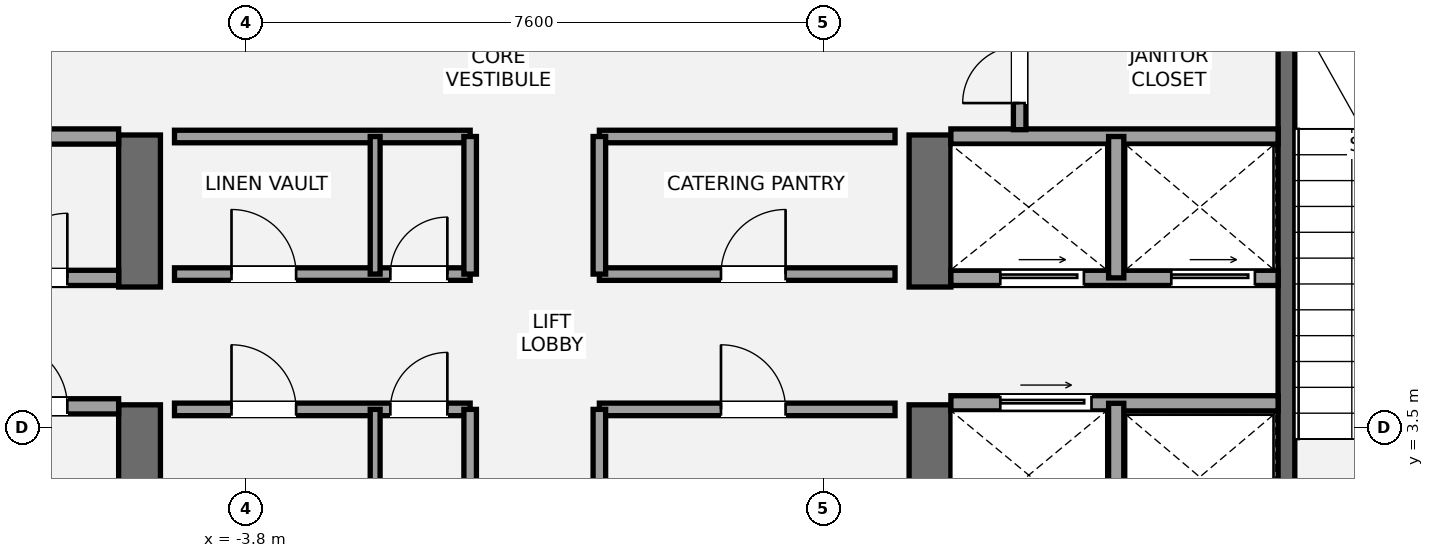
"""IFC4 building model, lengths in metres.
Left out: names, types, materials, properties, quantities, classifications, styles, units other than length and angle.
Written with IfcOpenShell. Run it as: python <this file> out.ifc"""

import sys

from ifc_helpers import new_model, si_unit, direction, frame, frame_2d, origin, place, context, subcontext, project, spatial, rectangle, extrude, element, fill, save


model = new_model("IFC4")
c1 = context("Model", 3, precision=1e-05, world=origin(), true_north=direction((0.0, 1.0)))
c2 = subcontext(c1, "Body", "Model", "MODEL_VIEW")
j1 = project(units=[si_unit("LENGTHUNIT", "METRE"), si_unit("PLANEANGLEUNIT", "RADIAN")], contexts=[c1])
p1 = place(None, origin())
s1 = spatial("IfcSite", under=j1, at=p1, CompositionType="ELEMENT")
p2 = place(p1, origin())
s2 = spatial("IfcBuilding", under=s1, at=p2, CompositionType="ELEMENT")
p3 = place(p2, frame((0.0, 0.0, 260.4)))
s3 = spatial("IfcBuildingStorey", under=s2, at=p3, CompositionType="ELEMENT", Elevation=260.4)
p4 = place(p3, frame((-5.2, 1.3, 0.0), z_axis=(0.0, 0.0, 1.0), x_axis=(0.0, 1.0, 0.0)))
e1 = element("IfcWall", 1, at=p4, inside=s3, PredefinedType="SHEAR", context=c2, shape_type="SweptSolid", body=[
    extrude(rectangle(XDim=2.5, YDim=0.55, at=frame_2d((1.25, 0.0))), origin(), (0.0, 0.0, 1.0), 4.4),
])
p5 = place(p3, frame((-5.2, 5.35, 0.0), z_axis=(0.0, 0.0, 1.0), x_axis=(0.0, 1.0, 0.0)))
e2 = element("IfcWall", 2, at=p5, inside=s3, PredefinedType="SHEAR", context=c2, shape_type="SweptSolid", body=[
    extrude(rectangle(XDim=2.0, YDim=0.55, at=frame_2d((1.0, 0.0))), origin(), (0.0, 0.0, 1.0), 4.4),
])
p6 = place(p3, frame((5.2, 1.3, 0.0), z_axis=(0.0, 0.0, 1.0), x_axis=(0.0, 1.0, 0.0)))
e3 = element("IfcWall", 3, at=p6, inside=s3, PredefinedType="SHEAR", context=c2, shape_type="SweptSolid", body=[
    extrude(rectangle(XDim=2.5, YDim=0.55, at=frame_2d((1.25, 0.0))), origin(), (0.0, 0.0, 1.0), 4.4),
])
p7 = place(p3, frame((5.2, 5.35, 0.0), z_axis=(0.0, 0.0, 1.0), x_axis=(0.0, 1.0, 0.0)))
e4 = element("IfcWall", 4, at=p7, inside=s3, PredefinedType="SHEAR", context=c2, shape_type="SweptSolid", body=[
    extrude(rectangle(XDim=2.0, YDim=0.55, at=frame_2d((1.0, 0.0))), origin(), (0.0, 0.0, 1.0), 4.4),
])
p8 = place(p3, frame((9.89, 1.85, 0.0), z_axis=(0.0, 0.0, 1.0), x_axis=(0.0, 1.0, 0.0)))
e5 = element("IfcWall", 5, at=p8, inside=s3, PredefinedType="SHEAR", context=c2, shape_type="SweptSolid", body=[
    extrude(rectangle(XDim=7.15, YDim=0.22, at=frame_2d((3.575, 0.0))), origin(), (0.0, 0.0, 1.0), 4.4),
])
p9 = place(p3, frame((-9.78, 3.78, 0.0), z_axis=(0.0, 0.0, 1.0), x_axis=(1.0, 0.0, 0.0)))
e6 = element("IfcWall", 6, at=p9, inside=s3, PredefinedType="SOLIDWALL", context=c2, shape_type="SweptSolid", body=[
    extrude(rectangle(XDim=4.305, YDim=0.2, at=frame_2d((2.152, 0.0))), origin(), (0.0, 0.0, 1.0), 4.18),
])
p10 = place(p9, frame((2.78, 0.0, 0.0)))
e7 = element("IfcOpeningElement", 7, at=p10, cuts=e6, PredefinedType="OPENING", context=c2, shape_type="SweptSolid", body=[
    extrude(rectangle(XDim=0.85, YDim=2.1, at=frame_2d((0.425, 1.05))), frame((0.0, 0.11, 0.0), z_axis=(0.0, -1.0, 0.0), x_axis=(1.0, 0.0, 0.0)), (0.0, 0.0, 1.0), 0.22),
])
p11 = place(p3, frame((-9.78, 5.47, 0.0), z_axis=(0.0, 0.0, 1.0), x_axis=(1.0, 0.0, 0.0)))
e8 = element("IfcWall", 8, at=p11, inside=s3, PredefinedType="SOLIDWALL", context=c2, shape_type="SweptSolid", body=[
    extrude(rectangle(XDim=4.305, YDim=0.2, at=frame_2d((2.152, 0.0))), origin(), (0.0, 0.0, 1.0), 4.18),
])
p12 = place(p11, frame((2.78, 0.0, 0.0)))
e9 = element("IfcOpeningElement", 9, at=p12, cuts=e8, PredefinedType="OPENING", context=c2, shape_type="SweptSolid", body=[
    extrude(rectangle(XDim=0.85, YDim=2.1, at=frame_2d((0.425, 1.05))), frame((0.0, 0.11, 0.0), z_axis=(0.0, -1.0, 0.0), x_axis=(1.0, 0.0, 0.0)), (0.0, 0.0, 1.0), 0.22),
])
p13 = place(p3, frame((-9.78, 7.33, 0.0), z_axis=(0.0, 0.0, 1.0), x_axis=(1.0, 0.0, 0.0)))
e10 = element("IfcWall", 10, at=p13, inside=s3, PredefinedType="SOLIDWALL", context=c2, shape_type="SweptSolid", body=[
    extrude(rectangle(XDim=4.305, YDim=0.2, at=frame_2d((2.152, 0.0))), origin(), (0.0, 0.0, 1.0), 4.18),
])
p14 = place(p3, frame((5.475, 3.82, 0.0), z_axis=(0.0, 0.0, 1.0), x_axis=(1.0, 0.0, 0.0)))
e11 = element("IfcWall", 11, at=p14, inside=s3, PredefinedType="SOLIDWALL", context=c2, shape_type="SweptSolid", body=[
    extrude(rectangle(XDim=4.305, YDim=0.2, at=frame_2d((2.152, 0.0))), origin(), (0.0, 0.0, 1.0), 4.18),
])
p15 = place(p14, frame((0.65, 0.0, 0.0)))
e12 = element("IfcOpeningElement", 12, at=p15, cuts=e11, PredefinedType="OPENING", context=c2, shape_type="SweptSolid", body=[
    extrude(rectangle(XDim=1.2, YDim=2.2, at=frame_2d((0.6, 1.1))), frame((0.0, 0.11, 0.0), z_axis=(0.0, -1.0, 0.0), x_axis=(1.0, 0.0, 0.0)), (0.0, 0.0, 1.0), 0.22),
])
p16 = place(p3, frame((7.65, 1.85, 0.0), z_axis=(0.0, 0.0, 1.0), x_axis=(0.0, 1.0, 0.0)))
e13 = element("IfcWall", 13, at=p16, inside=s3, PredefinedType="SOLIDWALL", context=c2, shape_type="SweptSolid", body=[
    extrude(rectangle(XDim=1.97, YDim=0.2, at=frame_2d((0.985, 0.0))), origin(), (0.0, 0.0, 1.0), 4.18),
])
p17 = place(p3, frame((5.475, 5.47, 0.0), z_axis=(0.0, 0.0, 1.0), x_axis=(1.0, 0.0, 0.0)))
e14 = element("IfcWall", 14, at=p17, inside=s3, PredefinedType="SOLIDWALL", context=c2, shape_type="SweptSolid", body=[
    extrude(rectangle(XDim=4.305, YDim=0.2, at=frame_2d((2.152, 0.0))), origin(), (0.0, 0.0, 1.0), 4.18),
])
p18 = place(p17, frame((0.65, 0.0, 0.0)))
e15 = element("IfcOpeningElement", 15, at=p18, cuts=e14, PredefinedType="OPENING", context=c2, shape_type="SweptSolid", body=[
    extrude(rectangle(XDim=1.1, YDim=2.2, at=frame_2d((0.55, 1.1))), frame((0.0, 0.11, 0.0), z_axis=(0.0, -1.0, 0.0), x_axis=(1.0, 0.0, 0.0)), (0.0, 0.0, 1.0), 0.22),
])
p19 = place(p17, frame((2.9, 0.0, 0.0)))
e16 = element("IfcOpeningElement", 16, at=p19, cuts=e14, PredefinedType="OPENING", context=c2, shape_type="SweptSolid", body=[
    extrude(rectangle(XDim=1.1, YDim=2.2, at=frame_2d((0.55, 1.1))), frame((0.0, 0.11, 0.0), z_axis=(0.0, -1.0, 0.0), x_axis=(1.0, 0.0, 0.0)), (0.0, 0.0, 1.0), 0.22),
])
p20 = place(p3, frame((5.475, 7.33, 0.0), z_axis=(0.0, 0.0, 1.0), x_axis=(1.0, 0.0, 0.0)))
e17 = element("IfcWall", 17, at=p20, inside=s3, PredefinedType="SOLIDWALL", context=c2, shape_type="SweptSolid", body=[
    extrude(rectangle(XDim=4.305, YDim=0.2, at=frame_2d((2.152, 0.0))), origin(), (0.0, 0.0, 1.0), 4.18),
])
p21 = place(p3, frame((7.65, 5.47, 0.0), z_axis=(0.0, 0.0, 1.0), x_axis=(0.0, 1.0, 0.0)))
e18 = element("IfcWall", 18, at=p21, inside=s3, PredefinedType="SOLIDWALL", context=c2, shape_type="SweptSolid", body=[
    extrude(rectangle(XDim=1.86, YDim=0.2, at=frame_2d((0.93, 0.0))), origin(), (0.0, 0.0, 1.0), 4.18),
])
p22 = place(p3, frame((-4.74, 3.74, 0.0), z_axis=(0.0, 0.0, 1.0), x_axis=(1.0, 0.0, 0.0)))
e19 = element("IfcWall", 19, at=p22, inside=s3, PredefinedType="PARTITIONING", context=c2, shape_type="SweptSolid", body=[
    extrude(rectangle(XDim=3.89, YDim=0.165, at=frame_2d((1.945, 0.0))), origin(), (0.0, 0.0, 1.0), 4.18),
])
p23 = place(p22, frame((0.75, 0.0, 0.0)))
e20 = element("IfcOpeningElement", 20, at=p23, cuts=e19, PredefinedType="OPENING", context=c2, shape_type="SweptSolid", body=[
    extrude(rectangle(XDim=0.85, YDim=2.1, at=frame_2d((0.425, 1.05))), frame((0.0, 0.093, 0.0), z_axis=(0.0, -1.0, 0.0), x_axis=(1.0, 0.0, 0.0)), (0.0, 0.0, 1.0), 0.185),
])
p24 = place(p22, frame((2.84, 0.0, 0.0)))
e21 = element("IfcOpeningElement", 21, at=p24, cuts=e19, PredefinedType="OPENING", context=c2, shape_type="SweptSolid", body=[
    extrude(rectangle(XDim=0.75, YDim=2.1, at=frame_2d((0.375, 1.05))), frame((0.0, 0.093, 0.0), z_axis=(0.0, -1.0, 0.0), x_axis=(1.0, 0.0, 0.0)), (0.0, 0.0, 1.0), 0.185),
])
p25 = place(p3, frame((-0.85, 1.92, 0.0), z_axis=(0.0, 0.0, 1.0), x_axis=(0.0, 1.0, 0.0)))
e22 = element("IfcWall", 22, at=p25, inside=s3, PredefinedType="PARTITIONING", context=c2, shape_type="SweptSolid", body=[
    extrude(rectangle(XDim=1.82, YDim=0.165, at=frame_2d((0.91, 0.0))), origin(), (0.0, 0.0, 1.0), 4.18),
])
p26 = place(p3, frame((0.85, 3.74, 0.0), z_axis=(0.0, 0.0, 1.0), x_axis=(1.0, 0.0, 0.0)))
e23 = element("IfcWall", 23, at=p26, inside=s3, PredefinedType="PARTITIONING", context=c2, shape_type="SweptSolid", body=[
    extrude(rectangle(XDim=3.89, YDim=0.165, at=frame_2d((1.945, 0.0))), origin(), (0.0, 0.0, 1.0), 4.18),
])
p27 = place(p26, frame((1.6, 0.0, 0.0)))
e24 = element("IfcOpeningElement", 24, at=p27, cuts=e23, PredefinedType="OPENING", context=c2, shape_type="SweptSolid", body=[
    extrude(rectangle(XDim=0.85, YDim=2.1, at=frame_2d((0.425, 1.05))), frame((0.0, 0.093, 0.0), z_axis=(0.0, -1.0, 0.0), x_axis=(1.0, 0.0, 0.0)), (0.0, 0.0, 1.0), 0.185),
])
p28 = place(p3, frame((0.85, 1.92, 0.0), z_axis=(0.0, 0.0, 1.0), x_axis=(0.0, 1.0, 0.0)))
e25 = element("IfcWall", 25, at=p28, inside=s3, PredefinedType="PARTITIONING", context=c2, shape_type="SweptSolid", body=[
    extrude(rectangle(XDim=1.82, YDim=0.165, at=frame_2d((0.91, 0.0))), origin(), (0.0, 0.0, 1.0), 4.18),
])
p29 = place(p3, frame((-2.1, 1.92, 0.0), z_axis=(0.0, 0.0, 1.0), x_axis=(0.0, 1.0, 0.0)))
e26 = element("IfcWall", 26, at=p29, inside=s3, PredefinedType="PARTITIONING", context=c2, shape_type="SweptSolid", body=[
    extrude(rectangle(XDim=1.82, YDim=0.13, at=frame_2d((0.91, 0.0))), origin(), (0.0, 0.0, 1.0), 4.18),
])
p30 = place(p3, frame((-4.74, 5.52, 0.0), z_axis=(0.0, 0.0, 1.0), x_axis=(1.0, 0.0, 0.0)))
e27 = element("IfcWall", 27, at=p30, inside=s3, PredefinedType="PARTITIONING", context=c2, shape_type="SweptSolid", body=[
    extrude(rectangle(XDim=3.89, YDim=0.165, at=frame_2d((1.945, 0.0))), origin(), (0.0, 0.0, 1.0), 4.18),
])
p31 = place(p30, frame((0.75, 0.0, 0.0)))
e28 = element("IfcOpeningElement", 28, at=p31, cuts=e27, PredefinedType="OPENING", context=c2, shape_type="SweptSolid", body=[
    extrude(rectangle(XDim=0.85, YDim=2.1, at=frame_2d((0.425, 1.05))), frame((0.0, 0.093, 0.0), z_axis=(0.0, -1.0, 0.0), x_axis=(1.0, 0.0, 0.0)), (0.0, 0.0, 1.0), 0.185),
])
p32 = place(p30, frame((2.84, 0.0, 0.0)))
e29 = element("IfcOpeningElement", 29, at=p32, cuts=e27, PredefinedType="OPENING", context=c2, shape_type="SweptSolid", body=[
    extrude(rectangle(XDim=0.75, YDim=2.1, at=frame_2d((0.375, 1.05))), frame((0.0, 0.093, 0.0), z_axis=(0.0, -1.0, 0.0), x_axis=(1.0, 0.0, 0.0)), (0.0, 0.0, 1.0), 0.185),
])
p33 = place(p3, frame((-4.74, 7.33, 0.0), z_axis=(0.0, 0.0, 1.0), x_axis=(1.0, 0.0, 0.0)))
e30 = element("IfcWall", 30, at=p33, inside=s3, PredefinedType="PARTITIONING", context=c2, shape_type="SweptSolid", body=[
    extrude(rectangle(XDim=3.89, YDim=0.165, at=frame_2d((1.945, 0.0))), origin(), (0.0, 0.0, 1.0), 4.18),
])
p34 = place(p3, frame((-0.85, 5.52, 0.0), z_axis=(0.0, 0.0, 1.0), x_axis=(0.0, 1.0, 0.0)))
e31 = element("IfcWall", 31, at=p34, inside=s3, PredefinedType="PARTITIONING", context=c2, shape_type="SweptSolid", body=[
    extrude(rectangle(XDim=1.81, YDim=0.165, at=frame_2d((0.905, 0.0))), origin(), (0.0, 0.0, 1.0), 4.18),
])
p35 = place(p3, frame((0.85, 5.52, 0.0), z_axis=(0.0, 0.0, 1.0), x_axis=(1.0, 0.0, 0.0)))
e32 = element("IfcWall", 32, at=p35, inside=s3, PredefinedType="PARTITIONING", context=c2, shape_type="SweptSolid", body=[
    extrude(rectangle(XDim=3.89, YDim=0.165, at=frame_2d((1.945, 0.0))), origin(), (0.0, 0.0, 1.0), 4.18),
])
p36 = place(p35, frame((1.6, 0.0, 0.0)))
e33 = element("IfcOpeningElement", 33, at=p36, cuts=e32, PredefinedType="OPENING", context=c2, shape_type="SweptSolid", body=[
    extrude(rectangle(XDim=0.85, YDim=2.1, at=frame_2d((0.425, 1.05))), frame((0.0, 0.093, 0.0), z_axis=(0.0, -1.0, 0.0), x_axis=(1.0, 0.0, 0.0)), (0.0, 0.0, 1.0), 0.185),
])
p37 = place(p3, frame((0.85, 7.33, 0.0), z_axis=(0.0, 0.0, 1.0), x_axis=(1.0, 0.0, 0.0)))
e34 = element("IfcWall", 34, at=p37, inside=s3, PredefinedType="PARTITIONING", context=c2, shape_type="SweptSolid", body=[
    extrude(rectangle(XDim=3.89, YDim=0.165, at=frame_2d((1.945, 0.0))), origin(), (0.0, 0.0, 1.0), 4.18),
])
p38 = place(p3, frame((0.85, 5.52, 0.0), z_axis=(0.0, 0.0, 1.0), x_axis=(0.0, 1.0, 0.0)))
e35 = element("IfcWall", 35, at=p38, inside=s3, PredefinedType="PARTITIONING", context=c2, shape_type="SweptSolid", body=[
    extrude(rectangle(XDim=1.81, YDim=0.165, at=frame_2d((0.905, 0.0))), origin(), (0.0, 0.0, 1.0), 4.18),
])
p39 = place(p3, frame((-2.1, 5.52, 0.0), z_axis=(0.0, 0.0, 1.0), x_axis=(0.0, 1.0, 0.0)))
e36 = element("IfcWall", 36, at=p39, inside=s3, PredefinedType="PARTITIONING", context=c2, shape_type="SweptSolid", body=[
    extrude(rectangle(XDim=1.81, YDim=0.13, at=frame_2d((0.905, 0.0))), origin(), (0.0, 0.0, 1.0), 4.18),
])
p40 = place(p3, frame((6.38, 7.42, 0.0), z_axis=(0.0, 0.0, 1.0), x_axis=(0.0, 1.0, 0.0)))
e37 = element("IfcWall", 37, at=p40, inside=s3, PredefinedType="PARTITIONING", context=c2, shape_type="SweptSolid", body=[
    extrude(rectangle(XDim=1.58, YDim=0.165, at=frame_2d((0.79, 0.0))), origin(), (0.0, 0.0, 1.0), 4.18),
])
p41 = place(p40, frame((0.35, 0.0, 0.0)))
e38 = element("IfcOpeningElement", 38, at=p41, cuts=e37, PredefinedType="OPENING", context=c2, shape_type="SweptSolid", body=[
    extrude(rectangle(XDim=0.75, YDim=2.1, at=frame_2d((0.375, 1.05))), frame((0.0, 0.093, 0.0), z_axis=(0.0, -1.0, 0.0), x_axis=(1.0, 0.0, 0.0)), (0.0, 0.0, 1.0), 0.185),
])
p42 = place(p12, origin())
e39 = element("IfcDoor", 39, at=p42, inside=s3, OperationType="SINGLE_SWING_RIGHT", PredefinedType="DOOR", context=c2, shape_type="SweptSolid", body=[
    extrude(rectangle(XDim=0.85, YDim=2.1, at=frame_2d((0.425, 1.05))), frame((0.0, 0.025, 0.0), z_axis=(0.0, -1.0, 0.0), x_axis=(1.0, 0.0, 0.0)), (0.0, 0.0, 1.0), 0.05),
])
fill(e9, e39)
p43 = place(p10, origin())
e40 = element("IfcDoor", 40, at=p43, inside=s3, OperationType="SINGLE_SWING_LEFT", PredefinedType="DOOR", context=c2, shape_type="SweptSolid", body=[
    extrude(rectangle(XDim=0.85, YDim=2.1, at=frame_2d((0.425, 1.05))), frame((0.0, 0.025, 0.0), z_axis=(0.0, -1.0, 0.0), x_axis=(1.0, 0.0, 0.0)), (0.0, 0.0, 1.0), 0.05),
])
fill(e7, e40)
p44 = place(p15, origin())
e41 = element("IfcDoor", 41, at=p44, inside=s3, OperationType="SLIDING_TO_RIGHT", PredefinedType="DOOR", context=c2, shape_type="SweptSolid", body=[
    extrude(rectangle(XDim=1.2, YDim=2.2, at=frame_2d((0.6, 1.1))), frame((0.0, 0.025, 0.0), z_axis=(0.0, -1.0, 0.0), x_axis=(1.0, 0.0, 0.0)), (0.0, 0.0, 1.0), 0.05),
])
fill(e12, e41)
p45 = place(p18, origin())
e42 = element("IfcDoor", 42, at=p45, inside=s3, OperationType="SLIDING_TO_LEFT", PredefinedType="DOOR", context=c2, shape_type="SweptSolid", body=[
    extrude(rectangle(XDim=1.1, YDim=2.2, at=frame_2d((0.55, 1.1))), frame((0.0, 0.025, 0.0), z_axis=(0.0, -1.0, 0.0), x_axis=(1.0, 0.0, 0.0)), (0.0, 0.0, 1.0), 0.05),
])
fill(e15, e42)
p46 = place(p19, origin())
e43 = element("IfcDoor", 43, at=p46, inside=s3, OperationType="SLIDING_TO_LEFT", PredefinedType="DOOR", context=c2, shape_type="SweptSolid", body=[
    extrude(rectangle(XDim=1.1, YDim=2.2, at=frame_2d((0.55, 1.1))), frame((0.0, 0.025, 0.0), z_axis=(0.0, -1.0, 0.0), x_axis=(1.0, 0.0, 0.0)), (0.0, 0.0, 1.0), 0.05),
])
fill(e16, e43)
p47 = place(p23, origin())
e44 = element("IfcDoor", 44, at=p47, inside=s3, OperationType="SINGLE_SWING_LEFT", PredefinedType="DOOR", context=c2, shape_type="SweptSolid", body=[
    extrude(rectangle(XDim=0.85, YDim=2.1, at=frame_2d((0.425, 1.05))), frame((0.0, 0.025, 0.0), z_axis=(0.0, -1.0, 0.0), x_axis=(1.0, 0.0, 0.0)), (0.0, 0.0, 1.0), 0.05),
])
fill(e20, e44)
p48 = place(p24, origin())
e45 = element("IfcDoor", 45, at=p48, inside=s3, OperationType="SINGLE_SWING_RIGHT", PredefinedType="DOOR", context=c2, shape_type="SweptSolid", body=[
    extrude(rectangle(XDim=0.75, YDim=2.1, at=frame_2d((0.375, 1.05))), frame((0.0, 0.025, 0.0), z_axis=(0.0, -1.0, 0.0), x_axis=(1.0, 0.0, 0.0)), (0.0, 0.0, 1.0), 0.05),
])
fill(e21, e45)
p49 = place(p27, origin())
e46 = element("IfcDoor", 46, at=p49, inside=s3, OperationType="SINGLE_SWING_LEFT", PredefinedType="DOOR", context=c2, shape_type="SweptSolid", body=[
    extrude(rectangle(XDim=0.85, YDim=2.1, at=frame_2d((0.425, 1.05))), frame((0.0, 0.025, 0.0), z_axis=(0.0, -1.0, 0.0), x_axis=(1.0, 0.0, 0.0)), (0.0, 0.0, 1.0), 0.05),
])
fill(e24, e46)
p50 = place(p31, origin())
e47 = element("IfcDoor", 47, at=p50, inside=s3, OperationType="SINGLE_SWING_LEFT", PredefinedType="DOOR", context=c2, shape_type="SweptSolid", body=[
    extrude(rectangle(XDim=0.85, YDim=2.1, at=frame_2d((0.425, 1.05))), frame((0.0, 0.025, 0.0), z_axis=(0.0, -1.0, 0.0), x_axis=(1.0, 0.0, 0.0)), (0.0, 0.0, 1.0), 0.05),
])
fill(e28, e47)
p51 = place(p32, origin())
e48 = element("IfcDoor", 48, at=p51, inside=s3, OperationType="SINGLE_SWING_RIGHT", PredefinedType="DOOR", context=c2, shape_type="SweptSolid", body=[
    extrude(rectangle(XDim=0.75, YDim=2.1, at=frame_2d((0.375, 1.05))), frame((0.0, 0.025, 0.0), z_axis=(0.0, -1.0, 0.0), x_axis=(1.0, 0.0, 0.0)), (0.0, 0.0, 1.0), 0.05),
])
fill(e29, e48)
p52 = place(p36, origin())
e49 = element("IfcDoor", 49, at=p52, inside=s3, OperationType="SINGLE_SWING_RIGHT", PredefinedType="DOOR", context=c2, shape_type="SweptSolid", body=[
    extrude(rectangle(XDim=0.85, YDim=2.1, at=frame_2d((0.425, 1.05))), frame((0.0, 0.025, 0.0), z_axis=(0.0, -1.0, 0.0), x_axis=(1.0, 0.0, 0.0)), (0.0, 0.0, 1.0), 0.05),
])
fill(e33, e49)
p53 = place(p41, origin())
e50 = element("IfcDoor", 50, at=p53, inside=s3, OperationType="SINGLE_SWING_LEFT", PredefinedType="DOOR", context=c2, shape_type="SweptSolid", body=[
    extrude(rectangle(XDim=0.75, YDim=2.1, at=frame_2d((0.375, 1.05))), frame((0.0, 0.025, 0.0), z_axis=(0.0, -1.0, 0.0), x_axis=(1.0, 0.0, 0.0)), (0.0, 0.0, 1.0), 0.05),
])
fill(e38, e50)
save(model, sys.argv[1])
